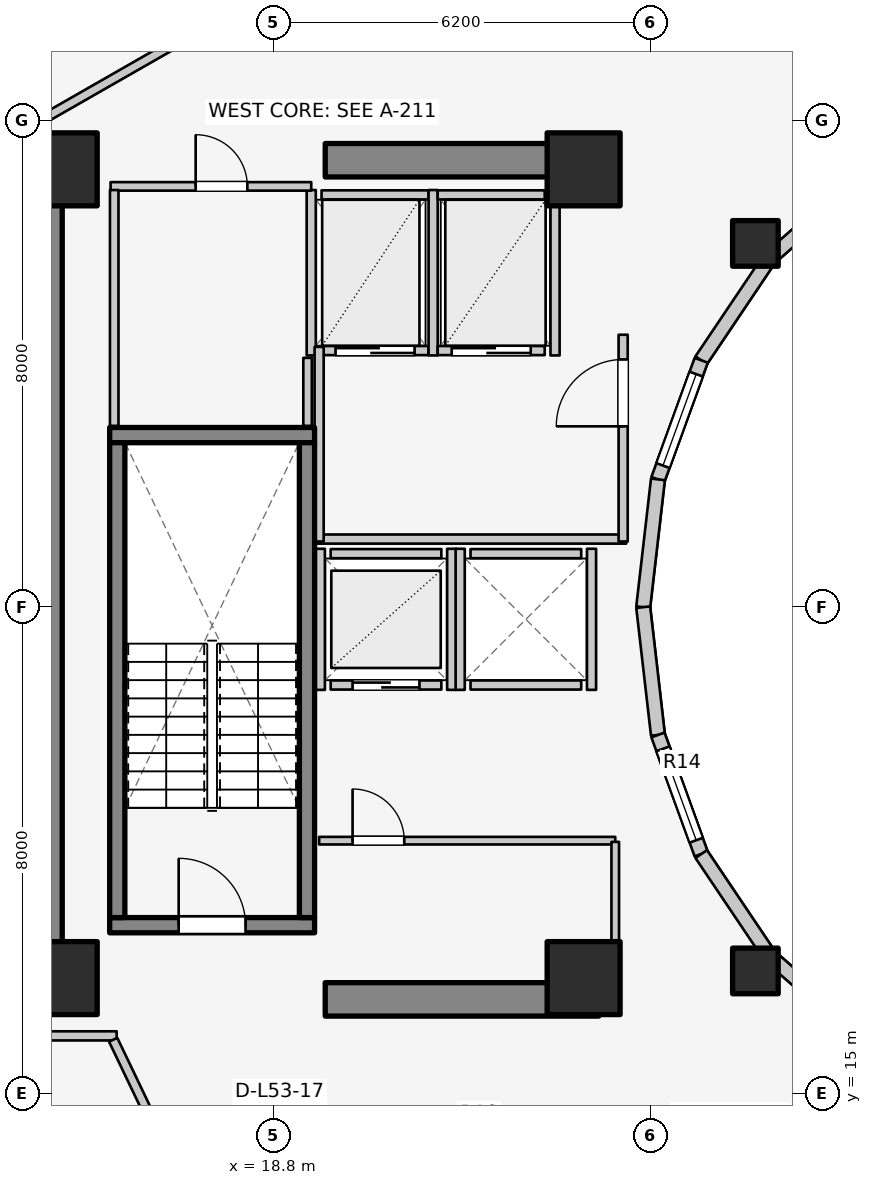
"""IFC4 building model, lengths in metres.
Left out: names, types, materials, properties, quantities, classifications, styles, units other than length and angle.
Written with IfcOpenShell. Run it as: python <this file> out.ifc"""

import sys

from ifc_helpers import new_model, si_unit, direction, frame, frame_2d, origin, origin_2d, place, context, subcontext, project, spatial, rectangle, extrude, element, fill, save


model = new_model("IFC4")
c1 = context("Model", 3, precision=1e-05, world=origin(), true_north=direction((0.0, 1.0)))
c2 = subcontext(c1, "Body", "Model", "MODEL_VIEW")
j1 = project(units=[si_unit("LENGTHUNIT", "METRE"), si_unit("PLANEANGLEUNIT", "RADIAN")], contexts=[c1])
p1 = place(None, origin())
s1 = spatial("IfcSite", under=j1, at=p1, CompositionType="ELEMENT")
p2 = place(p1, origin())
s2 = spatial("IfcBuilding", under=s1, at=p2, CompositionType="ELEMENT")
p3 = place(p2, frame((0.0, 0.0, 174.6)))
s3 = spatial("IfcBuildingStorey", under=s2, at=p3, CompositionType="ELEMENT", Elevation=174.6)
p4 = place(p3, frame((15.05, 17.05, 0.0), z_axis=(0.0, 0.0, 1.0), x_axis=(0.0, 1.0, 0.0)))
e1 = element("IfcWall", 1, at=p4, inside=s3, PredefinedType="SHEAR", context=c2, shape_type="SweptSolid", body=[
    extrude(rectangle(XDim=12.8, YDim=0.55, at=frame_2d((6.4, 0.0))), origin(), (0.0, 0.0, 1.0), 3.1),
])
for number, where, z_axis, x_axis in (
    (2, (19.65, 16.55, 0.0), (0.0, 0.0, 1.0), (1.0, 0.0, 0.0)),
    (3, (19.65, 30.35, 0.0), (0.0, 0.0, 1.0), (1.0, 0.0, 0.0)),
):
    element("IfcWall", number, at=place(p3, frame(where, z_axis=z_axis, x_axis=x_axis)), inside=s3, PredefinedType="SHEAR", context=c2, shape_type="SweptSolid", body=[
        extrude(rectangle(XDim=4.5, YDim=0.55, at=frame_2d((2.25, 0.0))), origin(), (0.0, 0.0, 1.0), 3.1),
    ])
p5 = place(p3, frame((16.105, 17.77, 0.0), z_axis=(0.0, 0.0, 1.0), x_axis=(1.0, 0.0, 0.0)))
e4 = element("IfcWall", 4, at=p5, inside=s3, PredefinedType="SOLIDWALL", context=c2, shape_type="SweptSolid", body=[
    extrude(rectangle(XDim=3.37, YDim=0.25, at=frame_2d((1.685, 0.0))), origin(), (0.0, 0.0, 1.0), 3.1),
])
p6 = place(p5, frame((1.135, 0.0, 0.0)))
e5 = element("IfcOpeningElement", 5, at=p6, cuts=e4, PredefinedType="OPENING", context=c2, shape_type="SweptSolid", body=[
    extrude(rectangle(XDim=1.1, YDim=2.1, at=frame_2d((0.55, 1.05))), frame((0.0, 0.135, 0.0), z_axis=(0.0, -1.0, 0.0), x_axis=(1.0, 0.0, 0.0)), (0.0, 0.0, 1.0), 0.27),
])
p7 = place(p3, frame((16.105, 25.83, 0.0), z_axis=(0.0, 0.0, 1.0), x_axis=(1.0, 0.0, 0.0)))
e6 = element("IfcWall", 6, at=p7, inside=s3, PredefinedType="SOLIDWALL", context=c2, shape_type="SweptSolid", body=[
    extrude(rectangle(XDim=3.37, YDim=0.25, at=frame_2d((1.685, 0.0))), origin(), (0.0, 0.0, 1.0), 3.1),
])
for number, where, z_axis, x_axis in (
    (7, (16.23, 17.895, 0.0), (0.0, 0.0, 1.0), (0.0, 1.0, 0.0)),
    (8, (19.35, 17.895, 0.0), (0.0, 0.0, 1.0), (0.0, 1.0, 0.0)),
):
    element("IfcWall", number, at=place(p3, frame(where, z_axis=z_axis, x_axis=x_axis)), inside=s3, PredefinedType="SOLIDWALL", context=c2, shape_type="SweptSolid", body=[
        extrude(rectangle(XDim=7.81, YDim=0.25, at=frame_2d((3.905, 0.0))), origin(), (0.0, 0.0, 1.0), 3.1),
    ])
for number, where, z_axis, x_axis in (
    (9, (15.3, 16.9, 0.0), (0.0, 0.0, 1.0), (1.0, 0.0, 0.0)),
    (10, (23.9, 16.9, 0.0), (0.0, 0.0, 1.0), (1.0, 0.0, 0.0)),
    (11, (23.9, 30.2, 0.0), (0.0, 0.0, 1.0), (1.0, 0.0, 0.0)),
    (12, (15.3, 30.2, 0.0), (0.0, 0.0, 1.0), (1.0, 0.0, 0.0)),
):
    element("IfcColumn", number, at=place(p3, frame(where, z_axis=z_axis, x_axis=x_axis)), inside=s3, PredefinedType="COLUMN", context=c2, shape_type="SweptSolid", body=[
        extrude(rectangle(XDim=1.2, YDim=1.2, at=origin_2d()), origin(), (0.0, 0.0, 1.0), 3.1),
    ])
for number, where, z_axis, x_axis in (
    (13, (26.725, 28.982, 0.0), (0.0, 0.0, 1.0), (1.0, 0.0, 0.0)),
    (14, (26.725, 17.018, 0.0), (0.0, 0.0, 1.0), (1.0, 0.0, 0.0)),
):
    element("IfcColumn", number, at=place(p3, frame(where, z_axis=z_axis, x_axis=x_axis)), inside=s3, PredefinedType="COLUMN", context=c2, shape_type="SweptSolid", body=[
        extrude(rectangle(XDim=0.75, YDim=0.75, at=origin_2d()), origin(), (0.0, 0.0, 1.0), 3.1),
    ])
p8 = place(p3, frame((28.44, 30.032, 0.0), z_axis=(0.0, 0.0, 1.0), x_axis=(-0.752576694707, -0.658504607869, 0.0)))
e15 = element("IfcWall", 15, at=p8, inside=s3, PredefinedType="STANDARD", context=c2, shape_type="SweptSolid", body=[
    extrude(rectangle(XDim=1.959, YDim=0.23, at=frame_2d((0.98, 0.0))), origin(), (0.0, 0.0, 1.0), 2.16),
])
p9 = place(p3, frame((26.965, 28.742, 0.0), z_axis=(0.0, 0.0, 1.0), x_axis=(-0.558197800898, -0.829707909492, 0.0)))
e16 = element("IfcWall", 16, at=p9, inside=s3, PredefinedType="STANDARD", context=c2, shape_type="SweptSolid", body=[
    extrude(rectangle(XDim=2.027, YDim=0.23, at=frame_2d((1.013, 0.0))), origin(), (0.0, 0.0, 1.0), 2.16),
])
p10 = place(p3, frame((25.834, 27.06, 0.0), z_axis=(0.0, 0.0, 1.0), x_axis=(-0.341423187295, -0.93990968033, 0.0)))
e17 = element("IfcWall", 17, at=p10, inside=s3, PredefinedType="STANDARD", context=c2, shape_type="SweptSolid", body=[
    extrude(rectangle(XDim=2.084, YDim=0.23, at=frame_2d((1.042, 0.0))), origin(), (0.0, 0.0, 1.0), 2.84),
])
p11 = place(p10, frame((0.242, 0.0, 0.85)))
e18 = element("IfcOpeningElement", 18, at=p11, cuts=e17, PredefinedType="OPENING", context=c2, shape_type="SweptSolid", body=[
    extrude(rectangle(XDim=1.6, YDim=1.65, at=frame_2d((0.8, 0.825))), frame((0.0, 0.125, 0.0), z_axis=(0.0, -1.0, 0.0), x_axis=(1.0, 0.0, 0.0)), (0.0, 0.0, 1.0), 0.25),
])
for number, where, z_axis, x_axis in (
    (19, (25.123, 25.102, 0.0), (0.0, 0.0, 1.0), (-0.115, -0.993, 0.0)),
    (20, (24.88, 23.0, 0.0), (0.0, 0.0, 1.0), (0.115, -0.993, 0.0)),
):
    element("IfcWall", number, at=place(p3, frame(where, z_axis=z_axis, x_axis=x_axis)), inside=s3, PredefinedType="STANDARD", context=c2, shape_type="SweptSolid", body=[
        extrude(rectangle(XDim=2.115, YDim=0.23, at=frame_2d((1.058, 0.0))), origin(), (0.0, 0.0, 1.0), 2.84),
    ])
p12 = place(p3, frame((25.123, 20.898, 0.0), z_axis=(0.0, 0.0, 1.0), x_axis=(0.341423187295, -0.93990968033, 0.0)))
e21 = element("IfcWall", 21, at=p12, inside=s3, PredefinedType="STANDARD", context=c2, shape_type="SweptSolid", body=[
    extrude(rectangle(XDim=2.084, YDim=0.23, at=frame_2d((1.042, 0.0))), origin(), (0.0, 0.0, 1.0), 2.84),
])
p13 = place(p12, frame((0.242, 0.0, 0.85)))
e22 = element("IfcOpeningElement", 22, at=p13, cuts=e21, PredefinedType="OPENING", context=c2, shape_type="SweptSolid", body=[
    extrude(rectangle(XDim=1.6, YDim=1.65, at=frame_2d((0.8, 0.825))), frame((0.0, 0.125, 0.0), z_axis=(0.0, -1.0, 0.0), x_axis=(1.0, 0.0, 0.0)), (0.0, 0.0, 1.0), 0.25),
])
p14 = place(p3, frame((25.834, 18.94, 0.0), z_axis=(0.0, 0.0, 1.0), x_axis=(0.558197800898, -0.829707909492, 0.0)))
e23 = element("IfcWall", 23, at=p14, inside=s3, PredefinedType="STANDARD", context=c2, shape_type="SweptSolid", body=[
    extrude(rectangle(XDim=2.027, YDim=0.23, at=frame_2d((1.013, 0.0))), origin(), (0.0, 0.0, 1.0), 2.16),
])
p15 = place(p3, frame((26.965, 17.258, 0.0), z_axis=(0.0, 0.0, 1.0), x_axis=(0.752576694707, -0.658504607869, 0.0)))
e24 = element("IfcWall", 24, at=p15, inside=s3, PredefinedType="STANDARD", context=c2, shape_type="SweptSolid", body=[
    extrude(rectangle(XDim=1.959, YDim=0.23, at=frame_2d((0.98, 0.0))), origin(), (0.0, 0.0, 1.0), 2.16),
])
p16 = place(p3, frame((19.74, 21.72, 0.0), z_axis=(0.0, 0.0, 1.0), x_axis=(1.0, 0.0, 0.0)))
e25 = element("IfcWall", 25, at=p16, inside=s3, PredefinedType="SOLIDWALL", context=c2, shape_type="SweptSolid", body=[
    extrude(rectangle(XDim=1.82, YDim=0.15, at=frame_2d((0.91, 0.0))), origin(), (0.0, 0.0, 1.0), 2.855),
])
p17 = place(p16, frame((0.36, 0.0, 0.0)))
e26 = element("IfcOpeningElement", 26, at=p17, cuts=e25, PredefinedType="OPENING", context=c2, shape_type="SweptSolid", body=[
    extrude(rectangle(XDim=1.1, YDim=2.1, at=frame_2d((0.55, 1.05))), frame((0.0, 0.085, 0.0), z_axis=(0.0, -1.0, 0.0), x_axis=(1.0, 0.0, 0.0)), (0.0, 0.0, 1.0), 0.17),
])
p18 = place(p3, frame((19.74, 23.88, 0.0), z_axis=(0.0, 0.0, 1.0), x_axis=(1.0, 0.0, 0.0)))
e27 = element("IfcWall", 27, at=p18, inside=s3, PredefinedType="SOLIDWALL", context=c2, shape_type="SweptSolid", body=[
    extrude(rectangle(XDim=1.82, YDim=0.15, at=frame_2d((0.91, 0.0))), origin(), (0.0, 0.0, 1.0), 2.855),
])
for number, where, z_axis, x_axis in (
    (28, (19.57, 21.64, 0.0), (0.0, 0.0, 1.0), (0.0, 1.0, 0.0)),
    (29, (21.73, 21.64, 0.0), (0.0, 0.0, 1.0), (0.0, 1.0, 0.0)),
):
    element("IfcWall", number, at=place(p3, frame(where, z_axis=z_axis, x_axis=x_axis)), inside=s3, PredefinedType="SOLIDWALL", context=c2, shape_type="SweptSolid", body=[
        extrude(rectangle(XDim=2.32, YDim=0.15, at=frame_2d((1.16, 0.0))), origin(), (0.0, 0.0, 1.0), 2.855),
    ])
for number, where, z_axis, x_axis in (
    (30, (22.04, 21.72, 0.0), (0.0, 0.0, 1.0), (1.0, 0.0, 0.0)),
    (31, (22.04, 23.88, 0.0), (0.0, 0.0, 1.0), (1.0, 0.0, 0.0)),
):
    element("IfcWall", number, at=place(p3, frame(where, z_axis=z_axis, x_axis=x_axis)), inside=s3, PredefinedType="SOLIDWALL", context=c2, shape_type="SweptSolid", body=[
        extrude(rectangle(XDim=1.82, YDim=0.15, at=frame_2d((0.91, 0.0))), origin(), (0.0, 0.0, 1.0), 2.12),
    ])
p19 = place(p3, frame((21.87, 21.64, 0.0), z_axis=(0.0, 0.0, 1.0), x_axis=(0.0, 1.0, 0.0)))
e32 = element("IfcWall", 32, at=p19, inside=s3, PredefinedType="SOLIDWALL", context=c2, shape_type="SweptSolid", body=[
    extrude(rectangle(XDim=2.32, YDim=0.15, at=frame_2d((1.16, 0.0))), origin(), (0.0, 0.0, 1.0), 2.855),
])
p20 = place(p3, frame((24.03, 21.64, 0.0), z_axis=(0.0, 0.0, 1.0), x_axis=(0.0, 1.0, 0.0)))
e33 = element("IfcWall", 33, at=p20, inside=s3, PredefinedType="SOLIDWALL", context=c2, shape_type="SweptSolid", body=[
    extrude(rectangle(XDim=2.32, YDim=0.15, at=frame_2d((1.16, 0.0))), origin(), (0.0, 0.0, 1.0), 2.12),
])
p21 = place(p3, frame((19.59, 27.22, 0.0), z_axis=(0.0, 0.0, 1.0), x_axis=(1.0, 0.0, 0.0)))
e34 = element("IfcWall", 34, at=p21, inside=s3, PredefinedType="SOLIDWALL", context=c2, shape_type="SweptSolid", body=[
    extrude(rectangle(XDim=1.76, YDim=0.15, at=frame_2d((0.88, 0.0))), origin(), (0.0, 0.0, 1.0), 2.855),
])
p22 = place(p21, frame((0.23, 0.0, 0.0)))
e35 = element("IfcOpeningElement", 35, at=p22, cuts=e34, PredefinedType="OPENING", context=c2, shape_type="SweptSolid", body=[
    extrude(rectangle(XDim=1.3, YDim=2.1, at=frame_2d((0.65, 1.05))), frame((0.0, 0.085, 0.0), z_axis=(0.0, -1.0, 0.0), x_axis=(1.0, 0.0, 0.0)), (0.0, 0.0, 1.0), 0.17),
])
p23 = place(p3, frame((19.59, 29.78, 0.0), z_axis=(0.0, 0.0, 1.0), x_axis=(1.0, 0.0, 0.0)))
e36 = element("IfcWall", 36, at=p23, inside=s3, PredefinedType="SOLIDWALL", context=c2, shape_type="SweptSolid", body=[
    extrude(rectangle(XDim=1.76, YDim=0.15, at=frame_2d((0.88, 0.0))), origin(), (0.0, 0.0, 1.0), 2.855),
])
for number, where, z_axis, x_axis in (
    (37, (19.42, 27.14, 0.0), (0.0, 0.0, 1.0), (0.0, 1.0, 0.0)),
    (38, (21.425, 27.14, 0.0), (0.0, 0.0, 1.0), (0.0, 1.0, 0.0)),
):
    element("IfcWall", number, at=place(p3, frame(where, z_axis=z_axis, x_axis=x_axis)), inside=s3, PredefinedType="SOLIDWALL", context=c2, shape_type="SweptSolid", body=[
        extrude(rectangle(XDim=2.72, YDim=0.15, at=frame_2d((1.36, 0.0))), origin(), (0.0, 0.0, 1.0), 2.855),
    ])
p24 = place(p3, frame((21.5, 27.22, 0.0), z_axis=(0.0, 0.0, 1.0), x_axis=(1.0, 0.0, 0.0)))
e39 = element("IfcWall", 39, at=p24, inside=s3, PredefinedType="SOLIDWALL", context=c2, shape_type="SweptSolid", body=[
    extrude(rectangle(XDim=1.76, YDim=0.15, at=frame_2d((0.88, 0.0))), origin(), (0.0, 0.0, 1.0), 2.855),
])
p25 = place(p24, frame((0.23, 0.0, 0.0)))
e40 = element("IfcOpeningElement", 40, at=p25, cuts=e39, PredefinedType="OPENING", context=c2, shape_type="SweptSolid", body=[
    extrude(rectangle(XDim=1.3, YDim=2.1, at=frame_2d((0.65, 1.05))), frame((0.0, 0.085, 0.0), z_axis=(0.0, -1.0, 0.0), x_axis=(1.0, 0.0, 0.0)), (0.0, 0.0, 1.0), 0.17),
])
p26 = place(p3, frame((21.5, 29.78, 0.0), z_axis=(0.0, 0.0, 1.0), x_axis=(1.0, 0.0, 0.0)))
e41 = element("IfcWall", 41, at=p26, inside=s3, PredefinedType="SOLIDWALL", context=c2, shape_type="SweptSolid", body=[
    extrude(rectangle(XDim=1.76, YDim=0.15, at=frame_2d((0.88, 0.0))), origin(), (0.0, 0.0, 1.0), 2.855),
])
p27 = place(p3, frame((23.43, 27.14, 0.0), z_axis=(0.0, 0.0, 1.0), x_axis=(0.0, 1.0, 0.0)))
e42 = element("IfcWall", 42, at=p27, inside=s3, PredefinedType="SOLIDWALL", context=c2, shape_type="SweptSolid", body=[
    extrude(rectangle(XDim=2.72, YDim=0.15, at=frame_2d((1.36, 0.0))), origin(), (0.0, 0.0, 1.0), 2.855),
])
p28 = place(p3, frame((19.52, 24.12, 0.0), z_axis=(0.0, 0.0, 1.0), x_axis=(1.0, 0.0, 0.0)))
e43 = element("IfcWall", 43, at=p28, inside=s3, PredefinedType="PARTITIONING", context=c2, shape_type="SweptSolid", body=[
    extrude(rectangle(XDim=5.08, YDim=0.15, at=frame_2d((2.54, 0.0))), origin(), (0.0, 0.0, 1.0), 2.12),
])
p29 = place(p3, frame((19.55, 24.08, 0.0), z_axis=(0.0, 0.0, 1.0), x_axis=(0.0, 1.0, 0.0)))
e44 = element("IfcWall", 44, at=p29, inside=s3, PredefinedType="PARTITIONING", context=c2, shape_type="SweptSolid", body=[
    extrude(rectangle(XDim=3.2, YDim=0.15, at=frame_2d((1.6, 0.0))), origin(), (0.0, 0.0, 1.0), 2.855),
])
p30 = place(p3, frame((24.55, 24.08, 0.0), z_axis=(0.0, 0.0, 1.0), x_axis=(0.0, 1.0, 0.0)))
e45 = element("IfcWall", 45, at=p30, inside=s3, PredefinedType="PARTITIONING", context=c2, shape_type="SweptSolid", body=[
    extrude(rectangle(XDim=3.4, YDim=0.15, at=frame_2d((1.7, 0.0))), origin(), (0.0, 0.0, 1.0), 2.855),
])
p31 = place(p30, frame((1.894, 0.0, 0.0)))
e46 = element("IfcOpeningElement", 46, at=p31, cuts=e45, PredefinedType="OPENING", context=c2, shape_type="SweptSolid", body=[
    extrude(rectangle(XDim=1.1, YDim=2.1, at=frame_2d((0.55, 1.05))), frame((0.0, 0.085, 0.0), z_axis=(0.0, -1.0, 0.0), x_axis=(1.0, 0.0, 0.0)), (0.0, 0.0, 1.0), 0.17),
])
p32 = place(p3, frame((19.55, 19.16, 0.0), z_axis=(0.0, 0.0, 1.0), x_axis=(1.0, 0.0, 0.0)))
e47 = element("IfcWall", 47, at=p32, inside=s3, PredefinedType="PARTITIONING", context=c2, shape_type="SweptSolid", body=[
    extrude(rectangle(XDim=4.87, YDim=0.125, at=frame_2d((2.435, 0.0))), origin(), (0.0, 0.0, 1.0), 2.12),
])
p33 = place(p32, frame((0.55, 0.0, 0.0)))
e48 = element("IfcOpeningElement", 48, at=p33, cuts=e47, PredefinedType="OPENING", context=c2, shape_type="SweptSolid", body=[
    extrude(rectangle(XDim=0.85, YDim=2.05, at=frame_2d((0.425, 1.025))), frame((0.0, 0.073, 0.0), z_axis=(0.0, -1.0, 0.0), x_axis=(1.0, 0.0, 0.0)), (0.0, 0.0, 1.0), 0.145),
])
p34 = place(p3, frame((24.42, 17.1, 0.0), z_axis=(0.0, 0.0, 1.0), x_axis=(0.0, 1.0, 0.0)))
e49 = element("IfcWall", 49, at=p34, inside=s3, PredefinedType="PARTITIONING", context=c2, shape_type="SweptSolid", body=[
    extrude(rectangle(XDim=2.04, YDim=0.125, at=frame_2d((1.02, 0.0))), origin(), (0.0, 0.0, 1.0), 2.232),
])
p35 = place(p3, frame((16.12, 29.92, 0.0), z_axis=(0.0, 0.0, 1.0), x_axis=(1.0, 0.0, 0.0)))
e50 = element("IfcWall", 50, at=p35, inside=s3, PredefinedType="PLUMBINGWALL", context=c2, shape_type="SweptSolid", body=[
    extrude(rectangle(XDim=3.3, YDim=0.14, at=frame_2d((1.65, 0.0))), origin(), (0.0, 0.0, 1.0), 2.855),
])
p36 = place(p35, frame((1.399, 0.0, 0.0)))
e51 = element("IfcOpeningElement", 51, at=p36, cuts=e50, PredefinedType="OPENING", context=c2, shape_type="SweptSolid", body=[
    extrude(rectangle(XDim=0.85, YDim=2.05, at=frame_2d((0.425, 1.025))), frame((0.0, 0.08, 0.0), z_axis=(0.0, -1.0, 0.0), x_axis=(1.0, 0.0, 0.0)), (0.0, 0.0, 1.0), 0.16),
])
p37 = place(p3, frame((16.18, 25.98, 0.0), z_axis=(0.0, 0.0, 1.0), x_axis=(0.0, 1.0, 0.0)))
e52 = element("IfcWall", 52, at=p37, inside=s3, PredefinedType="PLUMBINGWALL", context=c2, shape_type="SweptSolid", body=[
    extrude(rectangle(XDim=3.88, YDim=0.14, at=frame_2d((1.94, 0.0))), origin(), (0.0, 0.0, 1.0), 2.855),
])
p38 = place(p3, frame((19.36, 25.98, 0.0), z_axis=(0.0, 0.0, 1.0), x_axis=(0.0, 1.0, 0.0)))
e53 = element("IfcWall", 53, at=p38, inside=s3, PredefinedType="PLUMBINGWALL", context=c2, shape_type="SweptSolid", body=[
    extrude(rectangle(XDim=1.12, YDim=0.14, at=frame_2d((0.56, 0.0))), origin(), (0.0, 0.0, 1.0), 2.855),
])
p39 = place(p3, frame((17.243, 32.305, 0.0), z_axis=(0.0, 0.0, 1.0), x_axis=(-0.867991349648, -0.496579315857, 0.0)))
e54 = element("IfcWall", 54, at=p39, inside=s3, PredefinedType="PARTITIONING", context=c2, shape_type="SweptSolid", body=[
    extrude(rectangle(XDim=2.567, YDim=0.15, at=frame_2d((1.283, 0.0))), origin(), (0.0, 0.0, 1.0), 2.22),
])
p40 = place(p3, frame((10.96, 15.95, 0.0), z_axis=(0.0, 0.0, 1.0), x_axis=(1.0, 0.0, 0.0)))
e55 = element("IfcWall", 55, at=p40, inside=s3, PredefinedType="PARTITIONING", context=c2, shape_type="SweptSolid", body=[
    extrude(rectangle(XDim=5.26, YDim=0.15, at=frame_2d((2.63, 0.0))), origin(), (0.0, 0.0, 1.0), 2.22),
])
p41 = place(p3, frame((17.222, 13.675, 0.0), z_axis=(0.0, 0.0, 1.0), x_axis=(-0.431973389813, 0.901886351207, 0.0)))
e56 = element("IfcWall", 56, at=p41, inside=s3, PredefinedType="PARTITIONING", context=c2, shape_type="SweptSolid", body=[
    extrude(rectangle(XDim=2.452, YDim=0.15, at=frame_2d((1.226, 0.0))), origin(), (0.0, 0.0, 1.0), 2.855),
])
p42 = place(p3, frame((28.45, 15.985, 0.0), z_axis=(0.0, 0.0, 1.0), x_axis=(-0.523587550846, -0.851971875474, 0.0)))
e57 = element("IfcWall", 57, at=p42, inside=s3, PredefinedType="PARTITIONING", context=c2, shape_type="SweptSolid", body=[
    extrude(rectangle(XDim=3.153, YDim=0.125, at=frame_2d((1.577, 0.0))), origin(), (0.0, 0.0, 1.0), 2.299),
])
p43 = place(p11, origin())
e58 = element("IfcWindow", 58, at=p43, inside=s3, PartitioningType="SINGLE_PANEL", PredefinedType="WINDOW", context=c2, shape_type="SweptSolid", body=[
    extrude(rectangle(XDim=1.6, YDim=1.65, at=frame_2d((0.8, 0.825))), frame((0.0, 0.03, 0.0), z_axis=(0.0, -1.0, 0.0), x_axis=(1.0, 0.0, 0.0)), (0.0, 0.0, 1.0), 0.06),
])
fill(e18, e58)
p44 = place(p13, origin())
e59 = element("IfcWindow", 59, at=p44, inside=s3, PartitioningType="SINGLE_PANEL", PredefinedType="WINDOW", context=c2, shape_type="SweptSolid", body=[
    extrude(rectangle(XDim=1.6, YDim=1.65, at=frame_2d((0.8, 0.825))), frame((0.0, 0.03, 0.0), z_axis=(0.0, -1.0, 0.0), x_axis=(1.0, 0.0, 0.0)), (0.0, 0.0, 1.0), 0.06),
])
fill(e22, e59)
p45 = place(p6, origin())
e60 = element("IfcDoor", 60, at=p45, inside=s3, OperationType="SINGLE_SWING_LEFT", PredefinedType="DOOR", context=c2, shape_type="SweptSolid", body=[
    extrude(rectangle(XDim=1.1, YDim=2.1, at=frame_2d((0.55, 1.05))), frame((0.0, 0.025, 0.0), z_axis=(0.0, -1.0, 0.0), x_axis=(1.0, 0.0, 0.0)), (0.0, 0.0, 1.0), 0.05),
])
fill(e5, e60)
p46 = place(p17, origin())
e61 = element("IfcDoor", 61, at=p46, inside=s3, OperationType="DOUBLE_DOOR_SLIDING", PredefinedType="DOOR", context=c2, shape_type="SweptSolid", body=[
    extrude(rectangle(XDim=1.1, YDim=2.1, at=frame_2d((0.55, 1.05))), frame((0.0, 0.025, 0.0), z_axis=(0.0, -1.0, 0.0), x_axis=(1.0, 0.0, 0.0)), (0.0, 0.0, 1.0), 0.05),
])
fill(e26, e61)
p47 = place(p22, origin())
e62 = element("IfcDoor", 62, at=p47, inside=s3, OperationType="DOUBLE_DOOR_SLIDING", PredefinedType="DOOR", context=c2, shape_type="SweptSolid", body=[
    extrude(rectangle(XDim=1.3, YDim=2.1, at=frame_2d((0.65, 1.05))), frame((0.0, 0.025, 0.0), z_axis=(0.0, -1.0, 0.0), x_axis=(1.0, 0.0, 0.0)), (0.0, 0.0, 1.0), 0.05),
])
fill(e35, e62)
p48 = place(p25, origin())
e63 = element("IfcDoor", 63, at=p48, inside=s3, OperationType="DOUBLE_DOOR_SLIDING", PredefinedType="DOOR", context=c2, shape_type="SweptSolid", body=[
    extrude(rectangle(XDim=1.3, YDim=2.1, at=frame_2d((0.65, 1.05))), frame((0.0, 0.025, 0.0), z_axis=(0.0, -1.0, 0.0), x_axis=(1.0, 0.0, 0.0)), (0.0, 0.0, 1.0), 0.05),
])
fill(e40, e63)
p49 = place(p31, origin())
e64 = element("IfcDoor", 64, at=p49, inside=s3, OperationType="SINGLE_SWING_LEFT", PredefinedType="DOOR", context=c2, shape_type="SweptSolid", body=[
    extrude(rectangle(XDim=1.1, YDim=2.1, at=frame_2d((0.55, 1.05))), frame((0.0, 0.025, 0.0), z_axis=(0.0, -1.0, 0.0), x_axis=(1.0, 0.0, 0.0)), (0.0, 0.0, 1.0), 0.05),
])
fill(e46, e64)
p50 = place(p33, origin())
e65 = element("IfcDoor", 65, at=p50, inside=s3, OperationType="SINGLE_SWING_LEFT", PredefinedType="DOOR", context=c2, shape_type="SweptSolid", body=[
    extrude(rectangle(XDim=0.85, YDim=2.05, at=frame_2d((0.425, 1.025))), frame((0.0, 0.025, 0.0), z_axis=(0.0, -1.0, 0.0), x_axis=(1.0, 0.0, 0.0)), (0.0, 0.0, 1.0), 0.05),
])
fill(e48, e65)
p51 = place(p36, origin())
e66 = element("IfcDoor", 66, at=p51, inside=s3, OperationType="SINGLE_SWING_LEFT", PredefinedType="DOOR", context=c2, shape_type="SweptSolid", body=[
    extrude(rectangle(XDim=0.85, YDim=2.05, at=frame_2d((0.425, 1.025))), frame((0.0, 0.025, 0.0), z_axis=(0.0, -1.0, 0.0), x_axis=(1.0, 0.0, 0.0)), (0.0, 0.0, 1.0), 0.05),
])
fill(e51, e66)
save(model, sys.argv[1])
